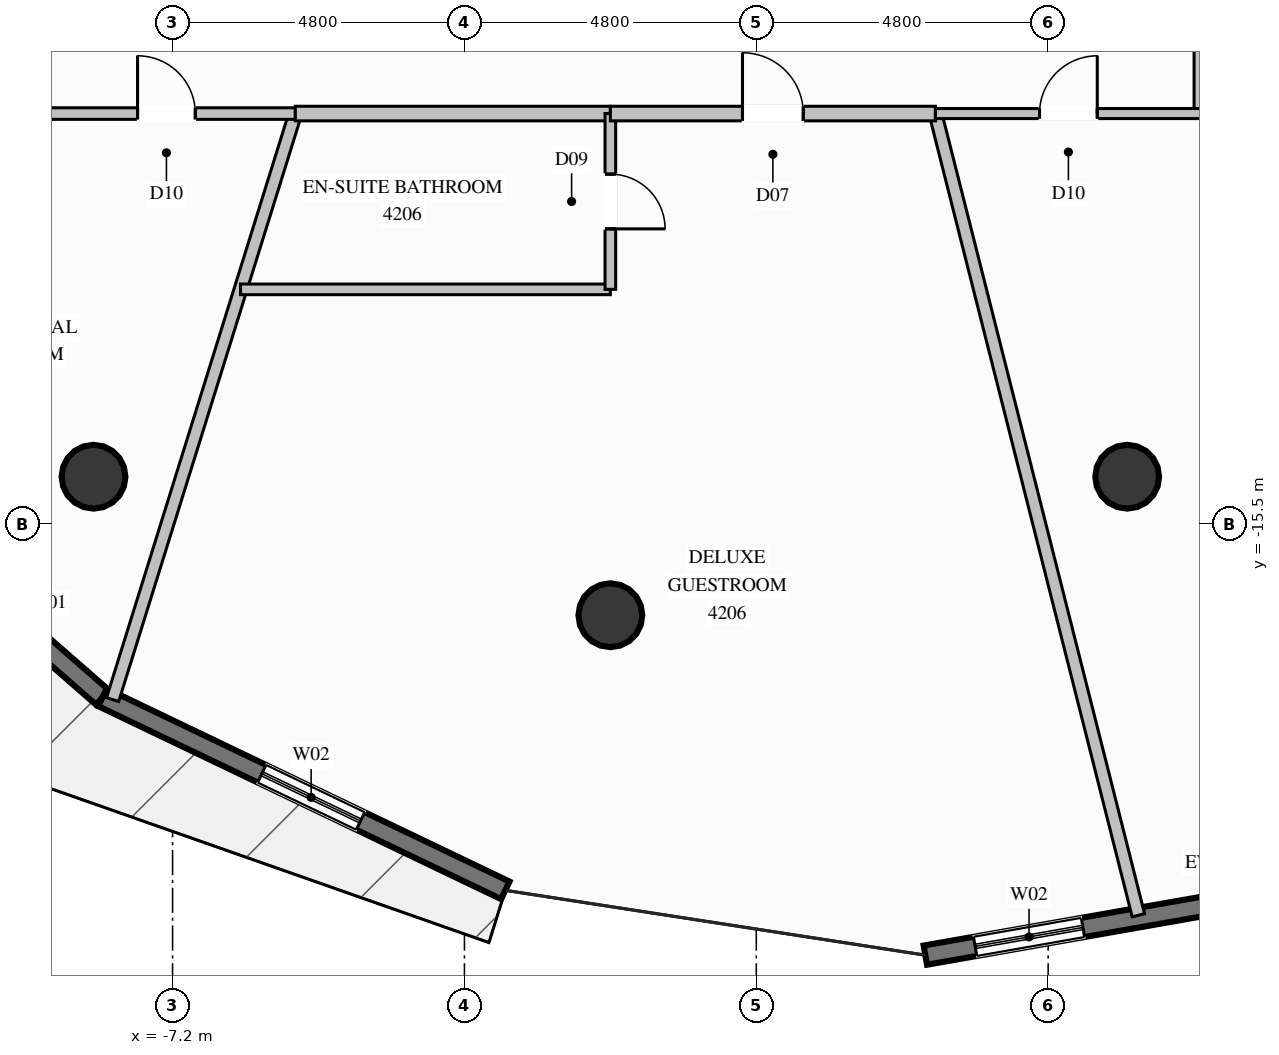
"""IFC4 building model, lengths in metres.
Left out: names, types, materials, properties, quantities, classifications, styles, units other than length and angle.
Written with IfcOpenShell. Run it as: python <this file> out.ifc"""

import sys

from ifc_helpers import new_model, si_unit, direction, frame, frame_2d, origin, origin_2d, place, context, subcontext, project, spatial, rectangle, circle, extrude, element, fill, save


model = new_model("IFC4")
c1 = context("Model", 3, precision=1e-05, world=origin(), true_north=direction((0.0, 1.0)))
c2 = subcontext(c1, "Body", "Model", "MODEL_VIEW")
j1 = project(units=[si_unit("LENGTHUNIT", "METRE"), si_unit("PLANEANGLEUNIT", "RADIAN")], contexts=[c1])
p1 = place(None, origin())
s1 = spatial("IfcSite", under=j1, at=p1, CompositionType="ELEMENT")
p2 = place(p1, origin())
s2 = spatial("IfcBuilding", under=s1, at=p2, CompositionType="ELEMENT")
p3 = place(p2, frame((0.0, 0.0, 156.6)))
s3 = spatial("IfcBuildingStorey", under=s2, at=p3, CompositionType="ELEMENT", Elevation=156.6)
for number, where, z_axis, x_axis in (
    (1, (-8.5, -14.722, 0.0), (0.0, 0.0, 1.0), (1.0, 0.0, 0.0)),
    (2, (0.0, -17.0, 0.0), (0.0, 0.0, 1.0), (1.0, 0.0, 0.0)),
    (3, (8.5, -14.722, 0.0), (0.0, 0.0, 1.0), (1.0, 0.0, 0.0)),
):
    element("IfcColumn", number, at=place(p3, frame(where, z_axis=z_axis, x_axis=x_axis)), inside=s3, PredefinedType="COLUMN", context=c2, shape_type="SweptSolid", body=[
        extrude(circle(Radius=0.525, at=origin_2d()), origin(), (0.0, 0.0, 1.0), 3.6),
    ])
p4 = place(p3, frame((-8.353, -18.351, 0.0), z_axis=(0.0, 0.0, 1.0), x_axis=(-0.753498250632, 0.657449911624, 0.0)))
e4 = element("IfcWall", 4, at=p4, inside=s3, PredefinedType="SOLIDWALL", context=c2, shape_type="SweptSolid", body=[
    extrude(rectangle(XDim=7.56, YDim=0.32, at=frame_2d((3.78, 0.0))), origin(), (0.0, 0.0, 1.0), 3.35),
])
p5 = place(p4, frame((2.88, 0.0, 0.35)))
e5 = element("IfcOpeningElement", 5, at=p5, cuts=e4, PredefinedType="OPENING", context=c2, shape_type="SweptSolid", body=[
    extrude(rectangle(XDim=1.8, YDim=2.6, at=frame_2d((0.9, 1.3))), frame((0.0, 0.17, 0.0), z_axis=(0.0, -1.0, 0.0), x_axis=(1.0, 0.0, 0.0)), (0.0, 0.0, 1.0), 0.34),
])
p6 = place(p3, frame((-1.728, -21.524, 0.0), z_axis=(0.0, 0.0, 1.0), x_axis=(-0.901902357259, 0.431939970332, 0.0)))
e6 = element("IfcWall", 6, at=p6, inside=s3, PredefinedType="SOLIDWALL", context=c2, shape_type="SweptSolid", body=[
    extrude(rectangle(XDim=7.346, YDim=0.32, at=frame_2d((3.673, 0.0))), origin(), (0.0, 0.0, 1.0), 3.35),
])
p7 = place(p6, frame((2.64, 0.0, 0.35)))
e7 = element("IfcOpeningElement", 7, at=p7, cuts=e6, PredefinedType="OPENING", context=c2, shape_type="SweptSolid", body=[
    extrude(rectangle(XDim=1.8, YDim=2.6, at=frame_2d((0.9, 1.3))), frame((0.0, 0.17, 0.0), z_axis=(0.0, -1.0, 0.0), x_axis=(1.0, 0.0, 0.0)), (0.0, 0.0, 1.0), 0.34),
])
p8 = place(p3, frame((11.693, -21.445, 0.0), z_axis=(0.0, 0.0, 1.0), x_axis=(-0.984896334406, -0.173145056165, 0.0)))
e8 = element("IfcWall", 8, at=p8, inside=s3, PredefinedType="SOLIDWALL", context=c2, shape_type="SweptSolid", body=[
    extrude(rectangle(XDim=6.613, YDim=0.32, at=frame_2d((3.307, 0.0))), origin(), (0.0, 0.0, 1.0), 3.35),
])
p9 = place(p8, frame((3.981, 0.0, 0.35)))
e9 = element("IfcOpeningElement", 9, at=p9, cuts=e8, PredefinedType="OPENING", context=c2, shape_type="SweptSolid", body=[
    extrude(rectangle(XDim=1.8, YDim=2.6, at=frame_2d((0.9, 1.3))), frame((0.0, 0.17, 0.0), z_axis=(0.0, -1.0, 0.0), x_axis=(1.0, 0.0, 0.0)), (0.0, 0.0, 1.0), 0.34),
])
p10 = place(p3, frame((9.72, -5.2, 0.0), z_axis=(0.0, 0.0, 1.0), x_axis=(0.852582050819, -0.52259338555, 0.0)))
e10 = element("IfcWall", 10, at=p10, inside=s3, PredefinedType="PARTITIONING", context=c2, shape_type="SweptSolid", body=[
    extrude(rectangle(XDim=5.482, YDim=0.21, at=frame_2d((2.741, 0.0))), origin(), (0.0, 0.0, 1.0), 2.717),
])
p11 = place(p3, frame((-5.181, -8.75, 0.0), z_axis=(0.0, 0.0, 1.0), x_axis=(-0.297695182725, -0.954660975521, 0.0)))
e11 = element("IfcWall", 11, at=p11, inside=s3, PredefinedType="PARTITIONING", context=c2, shape_type="SweptSolid", body=[
    extrude(rectangle(XDim=10.095, YDim=0.21, at=frame_2d((5.047, 0.0))), origin(), (0.0, 0.0, 1.0), 3.35),
])
p12 = place(p3, frame((-9.42, -8.75, 0.0), z_axis=(0.0, 0.0, 1.0), x_axis=(1.0, 0.0, 0.0)))
e12 = element("IfcWall", 12, at=p12, inside=s3, PredefinedType="PARTITIONING", context=c2, shape_type="SweptSolid", body=[
    extrude(rectangle(XDim=4.239, YDim=0.19, at=frame_2d((2.12, 0.0))), origin(), (0.0, 0.0, 1.0), 3.35),
])
p13 = place(p12, frame((1.644, 0.0, 0.0)))
e13 = element("IfcOpeningElement", 13, at=p13, cuts=e12, PredefinedType="OPENING", context=c2, shape_type="SweptSolid", body=[
    extrude(rectangle(XDim=0.95, YDim=2.1, at=frame_2d((0.475, 1.05))), frame((0.0, 0.105, 0.0), z_axis=(0.0, -1.0, 0.0), x_axis=(1.0, 0.0, 0.0)), (0.0, 0.0, 1.0), 0.21),
])
p14 = place(p3, frame((-5.181, -8.75, 0.0), z_axis=(0.0, 0.0, 1.0), x_axis=(1.0, 0.0, 0.0)))
e14 = element("IfcWall", 14, at=p14, inside=s3, PredefinedType="PARTITIONING", context=c2, shape_type="SweptSolid", body=[
    extrude(rectangle(XDim=5.181, YDim=0.24, at=frame_2d((2.59, 0.0))), origin(), (0.0, 0.0, 1.0), 3.35),
])
p15 = place(p3, frame((-6.082, -11.641, 0.0), z_axis=(0.0, 0.0, 1.0), x_axis=(1.0, 0.0, 0.0)))
e15 = element("IfcWall", 15, at=p15, inside=s3, PredefinedType="PLUMBINGWALL", context=c2, shape_type="SweptSolid", body=[
    extrude(rectangle(XDim=6.082, YDim=0.175, at=frame_2d((3.041, 0.0))), origin(), (0.0, 0.0, 1.0), 3.35),
])
p16 = place(p3, frame((0.0, -8.75, 0.0), z_axis=(0.0, 0.0, 1.0), x_axis=(0.0, -1.0, 0.0)))
e16 = element("IfcWall", 16, at=p16, inside=s3, PredefinedType="PLUMBINGWALL", context=c2, shape_type="SweptSolid", body=[
    extrude(rectangle(XDim=2.891, YDim=0.175, at=frame_2d((1.446, 0.0))), origin(), (0.0, 0.0, 1.0), 3.35),
])
p17 = place(p16, frame((0.996, 0.0, 0.0)))
e17 = element("IfcOpeningElement", 17, at=p17, cuts=e16, PredefinedType="OPENING", context=c2, shape_type="SweptSolid", body=[
    extrude(rectangle(XDim=0.9, YDim=2.1, at=frame_2d((0.45, 1.05))), frame((0.0, 0.098, 0.0), z_axis=(0.0, -1.0, 0.0), x_axis=(1.0, 0.0, 0.0)), (0.0, 0.0, 1.0), 0.195),
])
p18 = place(p3, frame((5.346, -8.75, 0.0), z_axis=(0.0, 0.0, 1.0), x_axis=(0.245448987191, -0.969409508251, 0.0)))
e18 = element("IfcWall", 18, at=p18, inside=s3, PredefinedType="PARTITIONING", context=c2, shape_type="SweptSolid", body=[
    extrude(rectangle(XDim=13.6, YDim=0.21, at=frame_2d((6.8, 0.0))), origin(), (0.0, 0.0, 1.0), 3.35),
])
p19 = place(p3, frame((0.0, -8.75, 0.0), z_axis=(0.0, 0.0, 1.0), x_axis=(1.0, 0.0, 0.0)))
e19 = element("IfcWall", 19, at=p19, inside=s3, PredefinedType="PARTITIONING", context=c2, shape_type="SweptSolid", body=[
    extrude(rectangle(XDim=5.346, YDim=0.24, at=frame_2d((2.673, 0.0))), origin(), (0.0, 0.0, 1.0), 3.35),
])
p20 = place(p19, frame((2.173, 0.0, 0.0)))
e20 = element("IfcOpeningElement", 20, at=p20, cuts=e19, PredefinedType="OPENING", context=c2, shape_type="SweptSolid", body=[
    extrude(rectangle(XDim=1.0, YDim=2.2, at=frame_2d((0.5, 1.1))), frame((0.0, 0.13, 0.0), z_axis=(0.0, -1.0, 0.0), x_axis=(1.0, 0.0, 0.0)), (0.0, 0.0, 1.0), 0.26),
])
p21 = place(p3, frame((9.72, -8.75, 0.0), z_axis=(0.0, 0.0, 1.0), x_axis=(0.0, 1.0, 0.0)))
e21 = element("IfcWall", 21, at=p21, inside=s3, PredefinedType="PARTITIONING", context=c2, shape_type="SweptSolid", body=[
    extrude(rectangle(XDim=3.55, YDim=0.24, at=frame_2d((1.775, 0.0))), origin(), (0.0, 0.0, 1.0), 3.35),
])
p22 = place(p3, frame((5.346, -8.75, 0.0), z_axis=(0.0, 0.0, 1.0), x_axis=(1.0, 0.0, 0.0)))
e22 = element("IfcWall", 22, at=p22, inside=s3, PredefinedType="PARTITIONING", context=c2, shape_type="SweptSolid", body=[
    extrude(rectangle(XDim=4.374, YDim=0.165, at=frame_2d((2.187, 0.0))), origin(), (0.0, 0.0, 1.0), 3.35),
])
p23 = place(p22, frame((1.712, 0.0, 0.0)))
e23 = element("IfcOpeningElement", 23, at=p23, cuts=e22, PredefinedType="OPENING", context=c2, shape_type="SweptSolid", body=[
    extrude(rectangle(XDim=0.95, YDim=2.1, at=frame_2d((0.475, 1.05))), frame((0.0, 0.093, 0.0), z_axis=(0.0, -1.0, 0.0), x_axis=(1.0, 0.0, 0.0)), (0.0, 0.0, 1.0), 0.185),
])
p24 = place(p7, origin())
e24 = element("IfcWindow", 24, at=p24, inside=s3, PartitioningType="SINGLE_PANEL", PredefinedType="WINDOW", context=c2, shape_type="SweptSolid", body=[
    extrude(rectangle(XDim=1.8, YDim=2.6, at=frame_2d((0.9, 1.3))), frame((0.0, 0.03, 0.0), z_axis=(0.0, -1.0, 0.0), x_axis=(1.0, 0.0, 0.0)), (0.0, 0.0, 1.0), 0.06),
])
fill(e7, e24)
p25 = place(p9, origin())
e25 = element("IfcWindow", 25, at=p25, inside=s3, PartitioningType="SINGLE_PANEL", PredefinedType="WINDOW", context=c2, shape_type="SweptSolid", body=[
    extrude(rectangle(XDim=1.8, YDim=2.6, at=frame_2d((0.9, 1.3))), frame((0.0, 0.03, 0.0), z_axis=(0.0, -1.0, 0.0), x_axis=(1.0, 0.0, 0.0)), (0.0, 0.0, 1.0), 0.06),
])
fill(e9, e25)
p26 = place(p13, origin())
e26 = element("IfcDoor", 26, at=p26, inside=s3, OperationType="SINGLE_SWING_LEFT", PredefinedType="DOOR", context=c2, shape_type="SweptSolid", body=[
    extrude(rectangle(XDim=0.95, YDim=2.1, at=frame_2d((0.475, 1.05))), frame((0.0, 0.025, 0.0), z_axis=(0.0, -1.0, 0.0), x_axis=(1.0, 0.0, 0.0)), (0.0, 0.0, 1.0), 0.05),
])
fill(e13, e26)
p27 = place(p17, origin())
e27 = element("IfcDoor", 27, at=p27, inside=s3, OperationType="SINGLE_SWING_RIGHT", PredefinedType="DOOR", context=c2, shape_type="SweptSolid", body=[
    extrude(rectangle(XDim=0.9, YDim=2.1, at=frame_2d((0.45, 1.05))), frame((0.0, 0.025, 0.0), z_axis=(0.0, -1.0, 0.0), x_axis=(1.0, 0.0, 0.0)), (0.0, 0.0, 1.0), 0.05),
])
fill(e17, e27)
p28 = place(p20, origin())
e28 = element("IfcDoor", 28, at=p28, inside=s3, OperationType="SINGLE_SWING_LEFT", PredefinedType="DOOR", context=c2, shape_type="SweptSolid", body=[
    extrude(rectangle(XDim=1.0, YDim=2.2, at=frame_2d((0.5, 1.1))), frame((0.0, 0.025, 0.0), z_axis=(0.0, -1.0, 0.0), x_axis=(1.0, 0.0, 0.0)), (0.0, 0.0, 1.0), 0.05),
])
fill(e20, e28)
p29 = place(p23, origin())
e29 = element("IfcDoor", 29, at=p29, inside=s3, OperationType="SINGLE_SWING_RIGHT", PredefinedType="DOOR", context=c2, shape_type="SweptSolid", body=[
    extrude(rectangle(XDim=0.95, YDim=2.1, at=frame_2d((0.475, 1.05))), frame((0.0, 0.025, 0.0), z_axis=(0.0, -1.0, 0.0), x_axis=(1.0, 0.0, 0.0)), (0.0, 0.0, 1.0), 0.05),
])
fill(e23, e29)
save(model, sys.argv[1])
